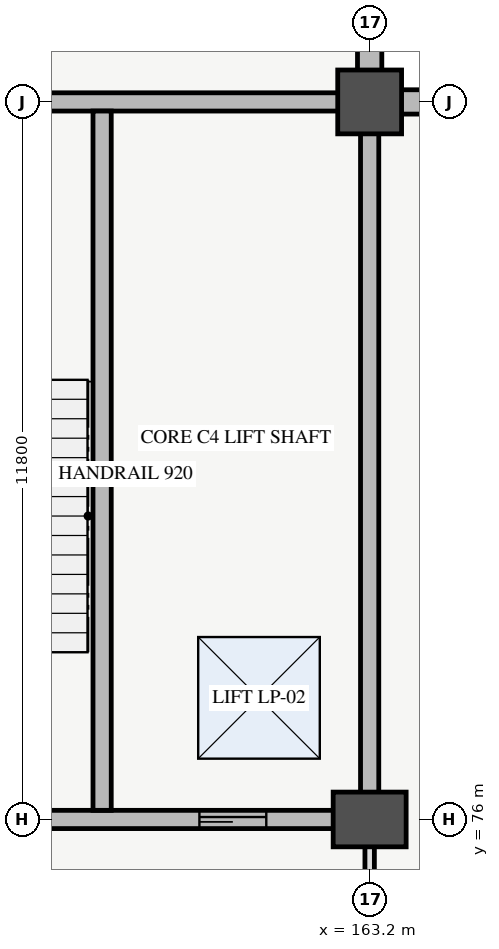
"""IFC4 building model, lengths in metres.
Left out: names, types, materials, properties, quantities, classifications, styles, units other than length and angle.
Written with IfcOpenShell. Run it as: python <this file> out.ifc"""

import sys

from ifc_helpers import new_model, si_unit, direction, frame, frame_2d, origin, origin_2d, place, context, subcontext, project, spatial, rectangle, extrude, element, fill, save


model = new_model("IFC4")
c1 = context("Model", 3, precision=1e-05, world=origin(), true_north=direction((0.0, 1.0)))
c2 = subcontext(c1, "Body", "Model", "MODEL_VIEW")
j1 = project(units=[si_unit("LENGTHUNIT", "METRE"), si_unit("PLANEANGLEUNIT", "RADIAN")], contexts=[c1])
p1 = place(None, origin())
s1 = spatial("IfcSite", under=j1, at=p1, CompositionType="ELEMENT")
p2 = place(p1, origin())
s2 = spatial("IfcBuilding", under=s1, at=p2, CompositionType="ELEMENT")
p3 = place(p2, frame((0.0, 0.0, -4.5)))
s3 = spatial("IfcBuildingStorey", under=s2, at=p3, CompositionType="ELEMENT", Elevation=-4.5)
p4 = place(p3, frame((163.2, 76.0, 0.0), z_axis=(0.0, 0.0, 1.0), x_axis=(1.0, 0.0, 0.0)))
e1 = element("IfcColumn", 1, at=p4, inside=s3, PredefinedType="COLUMN", context=c2, shape_type="SweptSolid", body=[
    extrude(rectangle(XDim=1.2, YDim=0.9, at=origin_2d()), origin(), (0.0, 0.0, 1.0), 4.5),
])
p5 = place(p3, frame((163.2, 87.8, 0.0), z_axis=(0.0, 0.0, 1.0), x_axis=(1.0, 0.0, 0.0)))
e2 = element("IfcColumn", 2, at=p5, inside=s3, PredefinedType="COLUMN", context=c2, shape_type="SweptSolid", body=[
    extrude(rectangle(XDim=1.05, YDim=1.05, at=origin_2d()), origin(), (0.0, 0.0, 1.0), 4.5),
])
p6 = place(p3, frame((153.0, 76.0, 0.0), z_axis=(0.0, 0.0, 1.0), x_axis=(1.0, 0.0, 0.0)))
e3 = element("IfcWall", 3, at=p6, inside=s3, PredefinedType="SHEAR", context=c2, shape_type="SweptSolid", body=[
    extrude(rectangle(XDim=10.2, YDim=0.3, at=frame_2d((5.1, 0.0))), origin(), (0.0, 0.0, 1.0), 4.5),
])
p7 = place(p6, frame((7.4, 0.0, 0.0)))
e4 = element("IfcOpeningElement", 4, at=p7, cuts=e3, PredefinedType="OPENING", context=c2, shape_type="SweptSolid", body=[
    extrude(rectangle(XDim=1.1, YDim=2.2, at=frame_2d((0.55, 1.1))), frame((0.0, 0.16, 0.0), z_axis=(0.0, -1.0, 0.0), x_axis=(1.0, 0.0, 0.0)), (0.0, 0.0, 1.0), 0.32),
])
p8 = place(p3, frame((153.0, 87.8, 0.0), z_axis=(0.0, 0.0, 1.0), x_axis=(1.0, 0.0, 0.0)))
e5 = element("IfcWall", 5, at=p8, inside=s3, PredefinedType="SHEAR", context=c2, shape_type="SweptSolid", body=[
    extrude(rectangle(XDim=10.2, YDim=0.3, at=frame_2d((5.1, 0.0))), origin(), (0.0, 0.0, 1.0), 4.5),
])
p9 = place(p3, frame((163.2, 76.0, 0.0), z_axis=(0.0, 0.0, 1.0), x_axis=(0.0, 1.0, 0.0)))
e6 = element("IfcWall", 6, at=p9, inside=s3, PredefinedType="SHEAR", context=c2, shape_type="SweptSolid", body=[
    extrude(rectangle(XDim=11.8, YDim=0.3, at=frame_2d((5.9, 0.0))), origin(), (0.0, 0.0, 1.0), 4.5),
])
p10 = place(p3, frame((214.0, 87.8, 0.0), z_axis=(0.0, 0.0, 1.0), x_axis=(-1.0, 0.0, 0.0)))
e7 = element("IfcWall", 7, at=p10, inside=s3, PredefinedType="SOLIDWALL", context=c2, shape_type="SweptSolid", body=[
    extrude(rectangle(XDim=50.8, YDim=0.4, at=frame_2d((25.4, 0.0))), origin(), (0.0, 0.0, 1.0), 4.1),
])
p11 = place(p3, frame((163.2, 87.8, 0.0), z_axis=(0.0, 0.0, 1.0), x_axis=(0.0, 1.0, 0.0)))
e8 = element("IfcWall", 8, at=p11, inside=s3, PredefinedType="SOLIDWALL", context=c2, shape_type="SweptSolid", body=[
    extrude(rectangle(XDim=11.8, YDim=0.4, at=frame_2d((5.9, 0.0))), origin(), (0.0, 0.0, 1.0), 4.1),
])
p12 = place(p3, frame((158.8, 76.15, 0.0), z_axis=(0.0, 0.0, 1.0), x_axis=(0.0, 1.0, 0.0)))
e9 = element("IfcWall", 9, at=p12, inside=s3, PredefinedType="SHEAR", context=c2, shape_type="SweptSolid", body=[
    extrude(rectangle(XDim=11.5, YDim=0.3, at=frame_2d((5.75, 0.0))), origin(), (0.0, 0.0, 1.0), 4.5),
])
p13 = place(p3, frame((163.2, 64.6, 0.0), z_axis=(0.0, 0.0, 1.0), x_axis=(0.0, 1.0, 0.0)))
e10 = element("IfcWall", 10, at=p13, inside=s3, PredefinedType="PARTITIONING", context=c2, shape_type="SweptSolid", body=[
    extrude(rectangle(XDim=11.0, YDim=0.155, at=frame_2d((5.5, 0.0))), origin(), (0.0, 0.0, 1.0), 2.75),
])
p14 = place(p13, frame((4.92, 0.0, 0.0)))
e11 = element("IfcOpeningElement", 11, at=p14, cuts=e10, PredefinedType="OPENING", context=c2, shape_type="SweptSolid", body=[
    extrude(rectangle(XDim=1.16, YDim=2.2, at=frame_2d((0.58, 1.1))), frame((0.0, 0.087, 0.0), z_axis=(0.0, -1.0, 0.0), x_axis=(1.0, 0.0, 0.0)), (0.0, 0.0, 1.0), 0.175),
])
p15 = place(p7, origin())
e12 = element("IfcDoor", 12, at=p15, inside=s3, OperationType="SLIDING_TO_RIGHT", PredefinedType="DOOR", context=c2, shape_type="SweptSolid", body=[
    extrude(rectangle(XDim=1.1, YDim=2.2, at=frame_2d((0.55, 1.1))), frame((0.0, 0.025, 0.0), z_axis=(0.0, -1.0, 0.0), x_axis=(1.0, 0.0, 0.0)), (0.0, 0.0, 1.0), 0.05),
])
fill(e4, e12)
save(model, sys.argv[1])
